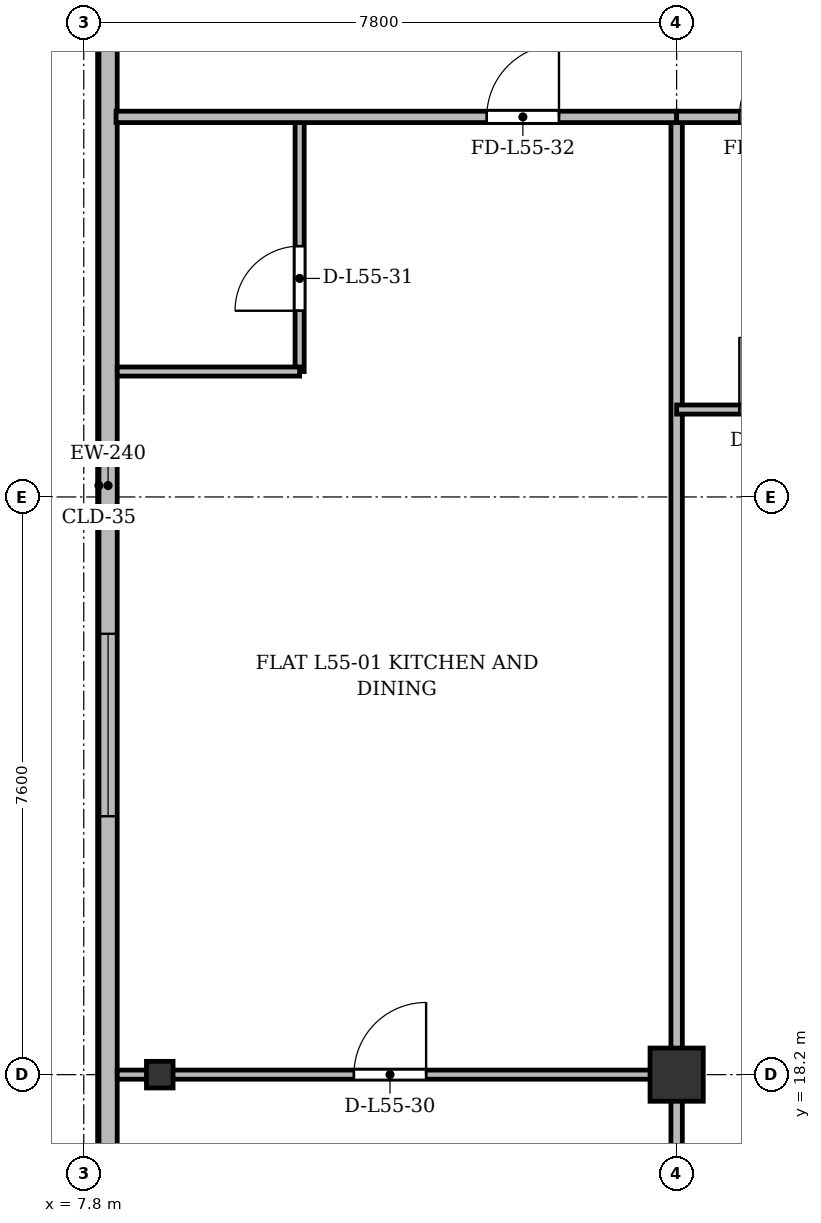
"""IFC4 building model, lengths in metres.
Left out: names, types, materials, properties, quantities, classifications, styles, units other than length and angle.
Written with IfcOpenShell. Run it as: python <this file> out.ifc"""

import sys

from ifc_helpers import new_model, si_unit, direction, frame, frame_2d, origin, origin_2d, place, context, subcontext, project, spatial, rectangle, i_section, extrude, source, transform, mapped, element, fill, save


model = new_model("IFC4")
c1 = context("Model", 3, precision=1e-05, world=origin(), true_north=direction((0.0, 1.0)))
c2 = subcontext(c1, "Body", "Model", "MODEL_VIEW")
j1 = project(units=[si_unit("LENGTHUNIT", "METRE"), si_unit("PLANEANGLEUNIT", "RADIAN")], contexts=[c1])
p1 = place(None, origin())
s1 = spatial("IfcSite", under=j1, at=p1, CompositionType="ELEMENT")
p2 = place(p1, origin())
s2 = spatial("IfcBuilding", under=s1, at=p2, CompositionType="ELEMENT")
p3 = place(p2, frame((0.0, 0.0, 212.1)))
s3 = spatial("IfcBuildingStorey", under=s2, at=p3, CompositionType="ELEMENT", Elevation=212.1)
m1 = source(origin(), c2, "Body", "SweptSolid", [
    extrude(i_section(OverallWidth=0.35, OverallDepth=0.35, WebThickness=0.018, FlangeThickness=0.028, at=origin_2d()), origin(), (0.0, 0.0, 1.0), 3.6),
])
p4 = place(p3, frame((8.8, 18.2, 0.0), z_axis=(0.0, 0.0, 1.0), x_axis=(1.0, 0.0, 0.0)))
e1 = element("IfcColumn", 1, at=p4, inside=s3, PredefinedType="COLUMN", context=c2, shape_type="MappedRepresentation", body=[
    mapped(m1, transform((0.0, 0.0, 0.0), x_axis=(1.0, 0.0, 0.0), y_axis=(0.0, 1.0, 0.0), z_axis=(0.0, 0.0, 1.0), scale=1.0)),
])
m2 = source(origin(), c2, "Body", "SweptSolid", [
    extrude(rectangle(XDim=0.7, YDim=0.7, at=origin_2d()), origin(), (0.0, 0.0, 1.0), 3.6),
])
p5 = place(p3, frame((15.6, 18.2, 0.0), z_axis=(0.0, 0.0, 1.0), x_axis=(1.0, 0.0, 0.0)))
e2 = element("IfcColumn", 2, at=p5, inside=s3, PredefinedType="COLUMN", context=c2, shape_type="MappedRepresentation", body=[
    mapped(m2, transform((0.0, 0.0, 0.0), x_axis=(1.0, 0.0, 0.0), y_axis=(0.0, 1.0, 0.0), z_axis=(0.0, 0.0, 1.0), scale=1.0)),
])
p6 = place(p3, frame((8.12, 6.4, 0.0), z_axis=(0.0, 0.0, 1.0), x_axis=(0.0, 1.0, 0.0)))
e3 = element("IfcWall", 3, at=p6, inside=s3, PredefinedType="SOLIDWALL", context=c2, shape_type="SweptSolid", body=[
    extrude(rectangle(XDim=39.1, YDim=0.24, at=frame_2d((19.55, 0.0))), origin(), (0.0, 0.0, 1.0), 3.36),
])
p7 = place(p6, frame((1.45, 0.0, 0.92)))
e4 = element("IfcOpeningElement", 4, at=p7, cuts=e3, PredefinedType="OPENING", context=c2, shape_type="SweptSolid", body=[
    extrude(rectangle(XDim=1.2, YDim=1.65, at=frame_2d((0.6, 0.825))), frame((0.0, 0.13, 0.0), z_axis=(0.0, -1.0, 0.0), x_axis=(1.0, 0.0, 0.0)), (0.0, 0.0, 1.0), 0.26),
])
p8 = place(p6, frame((3.8, 0.0, 0.92)))
e5 = element("IfcOpeningElement", 5, at=p8, cuts=e3, PredefinedType="OPENING", context=c2, shape_type="SweptSolid", body=[
    extrude(rectangle(XDim=2.4, YDim=2.1, at=frame_2d((1.2, 1.05))), frame((0.0, 0.13, 0.0), z_axis=(0.0, -1.0, 0.0), x_axis=(1.0, 0.0, 0.0)), (0.0, 0.0, 1.0), 0.26),
])
p9 = place(p6, frame((8.0, 0.0, 0.92)))
e6 = element("IfcOpeningElement", 6, at=p9, cuts=e3, PredefinedType="OPENING", context=c2, shape_type="SweptSolid", body=[
    extrude(rectangle(XDim=2.4, YDim=2.1, at=frame_2d((1.2, 1.05))), frame((0.0, 0.13, 0.0), z_axis=(0.0, -1.0, 0.0), x_axis=(1.0, 0.0, 0.0)), (0.0, 0.0, 1.0), 0.26),
])
p10 = place(p6, frame((15.2, 0.0, 0.92)))
e7 = element("IfcOpeningElement", 7, at=p10, cuts=e3, PredefinedType="OPENING", context=c2, shape_type="SweptSolid", body=[
    extrude(rectangle(XDim=2.4, YDim=2.1, at=frame_2d((1.2, 1.05))), frame((0.0, 0.13, 0.0), z_axis=(0.0, -1.0, 0.0), x_axis=(1.0, 0.0, 0.0)), (0.0, 0.0, 1.0), 0.26),
])
p11 = place(p6, frame((33.4, 0.0, 0.92)))
e8 = element("IfcOpeningElement", 8, at=p11, cuts=e3, PredefinedType="OPENING", context=c2, shape_type="SweptSolid", body=[
    extrude(rectangle(XDim=1.2, YDim=1.65, at=frame_2d((0.6, 0.825))), frame((0.0, 0.13, 0.0), z_axis=(0.0, -1.0, 0.0), x_axis=(1.0, 0.0, 0.0)), (0.0, 0.0, 1.0), 0.26),
])
p12 = place(p6, frame((36.75, 0.0, 0.92)))
e9 = element("IfcOpeningElement", 9, at=p12, cuts=e3, PredefinedType="OPENING", context=c2, shape_type="SweptSolid", body=[
    extrude(rectangle(XDim=1.2, YDim=1.65, at=frame_2d((0.6, 0.825))), frame((0.0, 0.13, 0.0), z_axis=(0.0, -1.0, 0.0), x_axis=(1.0, 0.0, 0.0)), (0.0, 0.0, 1.0), 0.26),
])
p13 = place(p3, frame((15.6, 3.625, 0.0), z_axis=(0.0, 0.0, 1.0), x_axis=(0.0, 1.0, 0.0)))
e10 = element("IfcWall", 10, at=p13, inside=s3, PredefinedType="PARTITIONING", context=c2, shape_type="SweptSolid", body=[
    extrude(rectangle(XDim=27.175, YDim=0.15, at=frame_2d((13.587, 0.0))), origin(), (0.0, 0.0, 1.0), 2.86),
])
p14 = place(p3, frame((8.24, 18.2, 0.0), z_axis=(0.0, 0.0, 1.0), x_axis=(1.0, 0.0, 0.0)))
e11 = element("IfcWall", 11, at=p14, inside=s3, PredefinedType="PARTITIONING", context=c2, shape_type="SweptSolid", body=[
    extrude(rectangle(XDim=7.36, YDim=0.12, at=frame_2d((3.68, 0.0))), origin(), (0.0, 0.0, 1.0), 2.91),
])
p15 = place(p14, frame((3.114, 0.0, 0.0)))
e12 = element("IfcOpeningElement", 12, at=p15, cuts=e11, PredefinedType="OPENING", context=c2, shape_type="SweptSolid", body=[
    extrude(rectangle(XDim=0.95, YDim=2.15, at=frame_2d((0.475, 1.075))), frame((0.0, 0.07, 0.0), z_axis=(0.0, -1.0, 0.0), x_axis=(1.0, 0.0, 0.0)), (0.0, 0.0, 1.0), 0.14),
])
p16 = place(p3, frame((10.64, 27.45, 0.0), z_axis=(0.0, 0.0, 1.0), x_axis=(0.0, 1.0, 0.0)))
e13 = element("IfcWall", 13, at=p16, inside=s3, PredefinedType="PARTITIONING", context=c2, shape_type="SweptSolid", body=[
    extrude(rectangle(XDim=3.35, YDim=0.12, at=frame_2d((1.675, 0.0))), origin(), (0.0, 0.0, 1.0), 3.36),
])
p17 = place(p16, frame((0.8, 0.0, 0.0)))
e14 = element("IfcOpeningElement", 14, at=p17, cuts=e13, PredefinedType="OPENING", context=c2, shape_type="SweptSolid", body=[
    extrude(rectangle(XDim=0.85, YDim=2.1, at=frame_2d((0.425, 1.05))), frame((0.0, 0.07, 0.0), z_axis=(0.0, -1.0, 0.0), x_axis=(1.0, 0.0, 0.0)), (0.0, 0.0, 1.0), 0.14),
])
p18 = place(p3, frame((8.24, 27.45, 0.0), z_axis=(0.0, 0.0, 1.0), x_axis=(1.0, 0.0, 0.0)))
e15 = element("IfcWall", 15, at=p18, inside=s3, PredefinedType="PARTITIONING", context=c2, shape_type="SweptSolid", body=[
    extrude(rectangle(XDim=2.4, YDim=0.12, at=frame_2d((1.2, 0.0))), origin(), (0.0, 0.0, 1.0), 2.86),
])
p19 = place(p3, frame((8.225, 30.8, 0.0), z_axis=(0.0, 0.0, 1.0), x_axis=(1.0, 0.0, 0.0)))
e16 = element("IfcWall", 16, at=p19, inside=s3, PredefinedType="PARTITIONING", context=c2, shape_type="SweptSolid", body=[
    extrude(rectangle(XDim=7.375, YDim=0.15, at=frame_2d((3.688, 0.0))), origin(), (0.0, 0.0, 1.0), 2.86),
])
p20 = place(p19, frame((4.877, 0.0, 0.0)))
e17 = element("IfcOpeningElement", 17, at=p20, cuts=e16, PredefinedType="OPENING", context=c2, shape_type="SweptSolid", body=[
    extrude(rectangle(XDim=0.95, YDim=2.15, at=frame_2d((0.475, 1.075))), frame((0.0, 0.085, 0.0), z_axis=(0.0, -1.0, 0.0), x_axis=(1.0, 0.0, 0.0)), (0.0, 0.0, 1.0), 0.17),
])
p21 = place(p3, frame((15.6, 30.8, 0.0), z_axis=(0.0, 0.0, 1.0), x_axis=(1.0, 0.0, 0.0)))
e18 = element("IfcWall", 18, at=p21, inside=s3, PredefinedType="PARTITIONING", context=c2, shape_type="SweptSolid", body=[
    extrude(rectangle(XDim=2.6, YDim=0.15, at=frame_2d((1.3, 0.0))), origin(), (0.0, 0.0, 1.0), 2.86),
])
p22 = place(p21, frame((0.825, 0.0, 0.0)))
e19 = element("IfcOpeningElement", 19, at=p22, cuts=e18, PredefinedType="OPENING", context=c2, shape_type="SweptSolid", body=[
    extrude(rectangle(XDim=0.95, YDim=2.15, at=frame_2d((0.475, 1.075))), frame((0.0, 0.085, 0.0), z_axis=(0.0, -1.0, 0.0), x_axis=(1.0, 0.0, 0.0)), (0.0, 0.0, 1.0), 0.17),
])
p23 = place(p3, frame((15.6, 26.95, 0.0), z_axis=(0.0, 0.0, 1.0), x_axis=(1.0, 0.0, 0.0)))
e20 = element("IfcWall", 20, at=p23, inside=s3, PredefinedType="PARTITIONING", context=c2, shape_type="SweptSolid", body=[
    extrude(rectangle(XDim=2.6, YDim=0.12, at=frame_2d((1.3, 0.0))), origin(), (0.0, 0.0, 1.0), 2.86),
])
p24 = place(p23, frame((0.825, 0.0, 0.0)))
e21 = element("IfcOpeningElement", 21, at=p24, cuts=e20, PredefinedType="OPENING", context=c2, shape_type="SweptSolid", body=[
    extrude(rectangle(XDim=0.95, YDim=2.15, at=frame_2d((0.475, 1.075))), frame((0.0, 0.07, 0.0), z_axis=(0.0, -1.0, 0.0), x_axis=(1.0, 0.0, 0.0)), (0.0, 0.0, 1.0), 0.14),
])
m3 = source(origin(), c2, "Body", "SweptSolid", [
    extrude(rectangle(XDim=2.4, YDim=2.1, at=frame_2d((1.2, 1.05))), frame((0.0, 0.03, 0.0), z_axis=(0.0, -1.0, 0.0), x_axis=(1.0, 0.0, 0.0)), (0.0, 0.0, 1.0), 0.06),
])
p25 = place(p10, origin())
e22 = element("IfcWindow", 22, at=p25, inside=s3, PartitioningType="SINGLE_PANEL", PredefinedType="WINDOW", context=c2, shape_type="MappedRepresentation", body=[
    mapped(m3, transform((0.0, 0.0, 0.0), x_axis=(1.0, 0.0, 0.0), y_axis=(0.0, 1.0, 0.0), z_axis=(0.0, 0.0, 1.0), scale=1.0)),
])
fill(e7, e22)
m4 = source(origin(), c2, "Body", "SweptSolid", [
    extrude(rectangle(XDim=0.95, YDim=2.15, at=frame_2d((0.475, 1.075))), frame((0.0, 0.025, 0.0), z_axis=(0.0, -1.0, 0.0), x_axis=(1.0, 0.0, 0.0)), (0.0, 0.0, 1.0), 0.05),
])
p26 = place(p15, origin())
e23 = element("IfcDoor", 23, at=p26, inside=s3, OperationType="SINGLE_SWING_RIGHT", PredefinedType="DOOR", context=c2, shape_type="MappedRepresentation", body=[
    mapped(m4, transform((0.0, 0.0, 0.0), x_axis=(1.0, 0.0, 0.0), y_axis=(0.0, 1.0, 0.0), z_axis=(0.0, 0.0, 1.0), scale=1.0)),
])
fill(e12, e23)
m5 = source(origin(), c2, "Body", "SweptSolid", [
    extrude(rectangle(XDim=0.85, YDim=2.1, at=frame_2d((0.425, 1.05))), frame((0.0, 0.025, 0.0), z_axis=(0.0, -1.0, 0.0), x_axis=(1.0, 0.0, 0.0)), (0.0, 0.0, 1.0), 0.05),
])
p27 = place(p17, origin())
e24 = element("IfcDoor", 24, at=p27, inside=s3, OperationType="SINGLE_SWING_LEFT", PredefinedType="DOOR", context=c2, shape_type="MappedRepresentation", body=[
    mapped(m5, transform((0.0, 0.0, 0.0), x_axis=(1.0, 0.0, 0.0), y_axis=(0.0, 1.0, 0.0), z_axis=(0.0, 0.0, 1.0), scale=1.0)),
])
fill(e14, e24)
p28 = place(p20, origin())
e25 = element("IfcDoor", 25, at=p28, inside=s3, OperationType="SINGLE_SWING_RIGHT", PredefinedType="DOOR", context=c2, shape_type="MappedRepresentation", body=[
    mapped(m4, transform((0.0, 0.0, 0.0), x_axis=(1.0, 0.0, 0.0), y_axis=(0.0, 1.0, 0.0), z_axis=(0.0, 0.0, 1.0), scale=1.0)),
])
fill(e17, e25)
p29 = place(p22, origin())
e26 = element("IfcDoor", 26, at=p29, inside=s3, OperationType="SINGLE_SWING_RIGHT", PredefinedType="DOOR", context=c2, shape_type="MappedRepresentation", body=[
    mapped(m4, transform((0.0, 0.0, 0.0), x_axis=(1.0, 0.0, 0.0), y_axis=(0.0, 1.0, 0.0), z_axis=(0.0, 0.0, 1.0), scale=1.0)),
])
fill(e19, e26)
p30 = place(p24, origin())
e27 = element("IfcDoor", 27, at=p30, inside=s3, OperationType="SINGLE_SWING_LEFT", PredefinedType="DOOR", context=c2, shape_type="MappedRepresentation", body=[
    mapped(m4, transform((0.0, 0.0, 0.0), x_axis=(1.0, 0.0, 0.0), y_axis=(0.0, 1.0, 0.0), z_axis=(0.0, 0.0, 1.0), scale=1.0)),
])
fill(e21, e27)
save(model, sys.argv[1])
